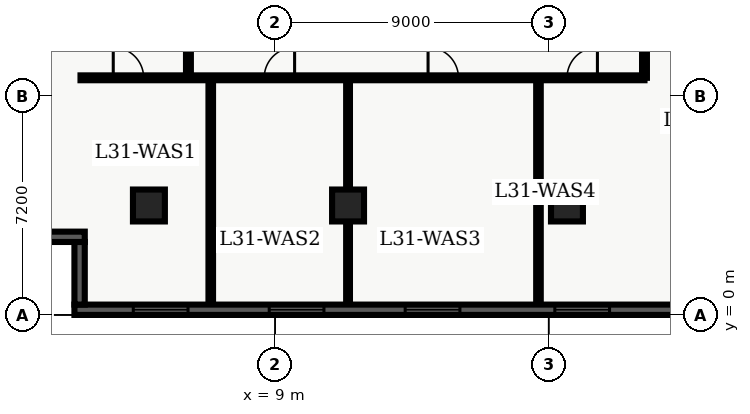
"""IFC4 building model, lengths in metres.
Left out: names, types, materials, properties, quantities, classifications, styles, units other than length and angle.
Written with IfcOpenShell. Run it as: python <this file> out.ifc"""

import sys

from ifc_helpers import new_model, entity, si_unit, converted_unit, direction, frame, origin_with_axes, origin_2d_with_axis, place, context, subcontext, project, spatial, polyline, rectangle, outline, extrude, element, fill, save


model = new_model("IFC4")
c1 = context("Model", 3, precision=1e-05, world=origin_with_axes(), true_north=direction((0.0, 1.0)))
c2 = subcontext(c1, "Body", "Model", "MODEL_VIEW")
j1 = project(units=[si_unit("LENGTHUNIT", "METRE"), converted_unit("PLANEANGLEUNIT", "DEGREE", entity("IfcPlaneAngleMeasure", 0.017), si_unit("PLANEANGLEUNIT", "RADIAN"), dimensions=[0, 0, 0, 0, 0, 0, 0])], contexts=[c1])
p1 = place(None, origin_with_axes())
s1 = spatial("IfcSite", under=j1, at=p1, CompositionType="ELEMENT")
p2 = place(p1, origin_with_axes())
s2 = spatial("IfcBuilding", under=s1, at=p2, CompositionType="ELEMENT")
p3 = place(p2, frame((0.0, 0.0, 129.0), z_axis=(0.0, 0.0, 1.0), x_axis=(1.0, 0.0, 0.0)))
s3 = spatial("IfcBuildingStorey", under=s2, at=p3, CompositionType="ELEMENT", Elevation=129.0)
for number, where, z_axis, x_axis in (
    (1, (11.4, 3.6, 0.0), (0.0, 0.0, 1.0), (1.0, 0.0, 0.0)),
    (2, (18.6, 3.6, 0.0), (0.0, 0.0, 1.0), (1.0, 0.0, 0.0)),
    (3, (4.85, 3.6, 0.0), (0.0, 0.0, 1.0), (1.0, 0.0, 0.0)),
):
    element("IfcColumn", number, at=place(p3, frame(where, z_axis=z_axis, x_axis=x_axis)), inside=s3, PredefinedType="COLUMN", context=c2, shape_type="SweptSolid", body=[
        extrude(rectangle(XDim=1.05, YDim=1.05, at=origin_2d_with_axis()), origin_with_axes(), (0.0, 0.0, 1.0), 3.9),
    ])
p4 = place(p3, frame((2.6, 7.8, 0.0), z_axis=(0.0, 0.0, 1.0), x_axis=(1.0, 0.0, 0.0)))
e4 = element("IfcWall", 4, at=p4, inside=s3, PredefinedType="PARTITIONING", context=c2, shape_type="SweptSolid", body=[
    extrude(outline(polyline([(0.0, -0.08), (18.55, -0.08), (18.55, 0.08), (0.0, 0.08), (0.0, -0.08)])), origin_with_axes(), (0.0, 0.0, 1.0), 2.7),
])
p5 = place(p4, frame((1.577, 0.0, 0.0), z_axis=(0.0, 0.0, 1.0), x_axis=(1.0, 0.0, 0.0)))
e5 = element("IfcOpeningElement", 5, at=p5, cuts=e4, PredefinedType="OPENING", context=c2, shape_type="SweptSolid", body=[
    extrude(rectangle(XDim=1.0, YDim=0.18, at=origin_2d_with_axis()), origin_with_axes(), (0.0, 0.0, 1.0), 2.15),
])
p6 = place(p4, frame((6.542, 0.0, 0.0), z_axis=(0.0, 0.0, 1.0), x_axis=(1.0, 0.0, 0.0)))
e6 = element("IfcOpeningElement", 6, at=p6, cuts=e4, PredefinedType="OPENING", context=c2, shape_type="SweptSolid", body=[
    extrude(rectangle(XDim=1.0, YDim=0.18, at=origin_2d_with_axis()), origin_with_axes(), (0.0, 0.0, 1.0), 2.15),
])
p7 = place(p4, frame((11.931, 0.0, 0.0), z_axis=(0.0, 0.0, 1.0), x_axis=(1.0, 0.0, 0.0)))
e7 = element("IfcOpeningElement", 7, at=p7, cuts=e4, PredefinedType="OPENING", context=c2, shape_type="SweptSolid", body=[
    extrude(rectangle(XDim=1.0, YDim=0.18, at=origin_2d_with_axis()), origin_with_axes(), (0.0, 0.0, 1.0), 2.15),
])
p8 = place(p4, frame((16.502, 0.0, 0.0), z_axis=(0.0, 0.0, 1.0), x_axis=(1.0, 0.0, 0.0)))
e8 = element("IfcOpeningElement", 8, at=p8, cuts=e4, PredefinedType="OPENING", context=c2, shape_type="SweptSolid", body=[
    extrude(rectangle(XDim=1.0, YDim=0.18, at=origin_2d_with_axis()), origin_with_axes(), (0.0, 0.0, 1.0), 2.15),
])
p9 = place(p3, frame((21.15, 7.8, 0.0), z_axis=(0.0, 0.0, 1.0), x_axis=(0.0, 1.0, 0.0)))
e9 = element("IfcWall", 9, at=p9, inside=s3, PredefinedType="PARTITIONING", context=c2, shape_type="SweptSolid", body=[
    extrude(outline(polyline([(0.0, -0.08), (32.7, -0.08), (32.7, 0.08), (0.0, 0.08), (0.0, -0.08)])), origin_with_axes(), (0.0, 0.0, 1.0), 2.7),
])
p10 = place(p9, frame((5.775, 0.0, 0.0), z_axis=(0.0, 0.0, 1.0), x_axis=(1.0, 0.0, 0.0)))
e10 = element("IfcOpeningElement", 10, at=p10, cuts=e9, PredefinedType="OPENING", context=c2, shape_type="SweptSolid", body=[
    extrude(rectangle(XDim=1.05, YDim=0.18, at=origin_2d_with_axis()), origin_with_axes(), (0.0, 0.0, 1.0), 2.15),
])
p11 = place(p3, frame((6.15, 7.8, 0.0), z_axis=(0.0, 0.0, 1.0), x_axis=(0.0, 1.0, 0.0)))
e11 = element("IfcWall", 11, at=p11, inside=s3, PredefinedType="PARTITIONING", context=c2, shape_type="SweptSolid", body=[
    extrude(outline(polyline([(0.0, -0.08), (32.7, -0.08), (32.7, 0.08), (0.0, 0.08), (0.0, -0.08)])), origin_with_axes(), (0.0, 0.0, 1.0), 2.7),
])
p12 = place(p11, frame((4.368, 0.0, 0.0), z_axis=(0.0, 0.0, 1.0), x_axis=(1.0, 0.0, 0.0)))
e12 = element("IfcOpeningElement", 12, at=p12, cuts=e11, PredefinedType="OPENING", context=c2, shape_type="SweptSolid", body=[
    extrude(rectangle(XDim=1.0, YDim=0.18, at=origin_2d_with_axis()), origin_with_axes(), (0.0, 0.0, 1.0), 2.15),
])
p13 = place(p11, frame((8.425, 0.0, 0.0), z_axis=(0.0, 0.0, 1.0), x_axis=(1.0, 0.0, 0.0)))
e13 = element("IfcOpeningElement", 13, at=p13, cuts=e11, PredefinedType="OPENING", context=c2, shape_type="SweptSolid", body=[
    extrude(rectangle(XDim=1.0, YDim=0.18, at=origin_2d_with_axis()), origin_with_axes(), (0.0, 0.0, 1.0), 2.15),
])
p14 = place(p11, frame((13.968, 0.0, 0.0), z_axis=(0.0, 0.0, 1.0), x_axis=(1.0, 0.0, 0.0)))
e14 = element("IfcOpeningElement", 14, at=p14, cuts=e11, PredefinedType="OPENING", context=c2, shape_type="SweptSolid", body=[
    extrude(rectangle(XDim=1.0, YDim=0.18, at=origin_2d_with_axis()), origin_with_axes(), (0.0, 0.0, 1.0), 2.15),
])
p15 = place(p11, frame((20.824, 0.0, 0.0), z_axis=(0.0, 0.0, 1.0), x_axis=(1.0, 0.0, 0.0)))
e15 = element("IfcOpeningElement", 15, at=p15, cuts=e11, PredefinedType="OPENING", context=c2, shape_type="SweptSolid", body=[
    extrude(rectangle(XDim=1.0, YDim=0.18, at=origin_2d_with_axis()), origin_with_axes(), (0.0, 0.0, 1.0), 2.15),
])
p16 = place(p11, frame((24.995, 0.0, 0.0), z_axis=(0.0, 0.0, 1.0), x_axis=(1.0, 0.0, 0.0)))
e16 = element("IfcOpeningElement", 16, at=p16, cuts=e11, PredefinedType="OPENING", context=c2, shape_type="SweptSolid", body=[
    extrude(rectangle(XDim=1.0, YDim=0.18, at=origin_2d_with_axis()), origin_with_axes(), (0.0, 0.0, 1.0), 2.15),
])
p17 = place(p11, frame((31.551, 0.0, 0.0), z_axis=(0.0, 0.0, 1.0), x_axis=(1.0, 0.0, 0.0)))
e17 = element("IfcOpeningElement", 17, at=p17, cuts=e11, PredefinedType="OPENING", context=c2, shape_type="SweptSolid", body=[
    extrude(rectangle(XDim=1.0, YDim=0.18, at=origin_2d_with_axis()), origin_with_axes(), (0.0, 0.0, 1.0), 2.15),
])
p18 = place(p3, frame((6.884, 0.335, 0.0), z_axis=(0.0, 0.0, 1.0), x_axis=(0.0, 1.0, 0.0)))
e18 = element("IfcWall", 18, at=p18, inside=s3, PredefinedType="PARTITIONING", context=c2, shape_type="SweptSolid", body=[
    extrude(outline(polyline([(0.0, -0.075), (7.365, -0.075), (7.365, 0.075), (0.0, 0.075), (0.0, -0.075)])), origin_with_axes(), (0.0, 0.0, 1.0), 2.7),
])
p19 = place(p3, frame((11.4, 0.335, 0.0), z_axis=(0.0, 0.0, 1.0), x_axis=(0.0, 1.0, 0.0)))
e19 = element("IfcWall", 19, at=p19, inside=s3, PredefinedType="PARTITIONING", context=c2, shape_type="SweptSolid", body=[
    extrude(outline(polyline([(0.0, -0.062), (7.365, -0.062), (7.365, 0.062), (0.0, 0.062), (0.0, -0.062)])), origin_with_axes(), (0.0, 0.0, 1.0), 2.7),
])
p20 = place(p3, frame((17.663, 0.335, 0.0), z_axis=(0.0, 0.0, 1.0), x_axis=(0.0, 1.0, 0.0)))
e20 = element("IfcWall", 20, at=p20, inside=s3, PredefinedType="PARTITIONING", context=c2, shape_type="SweptSolid", body=[
    extrude(outline(polyline([(0.0, -0.075), (7.365, -0.075), (7.365, 0.075), (0.0, 0.075), (0.0, -0.075)])), origin_with_axes(), (0.0, 0.0, 1.0), 2.7),
])
p21 = place(p3, frame((57.26, 0.17, 0.0), z_axis=(0.0, 0.0, 1.0), x_axis=(-1.0, 0.0, 0.0)))
e21 = element("IfcWall", 21, at=p21, inside=s3, PredefinedType="SOLIDWALL", context=c2, shape_type="SweptSolid", body=[
    extrude(outline(polyline([(0.0, -0.17), (54.86, -0.17), (54.86, 0.17), (0.0, 0.17), (0.0, -0.17)])), origin_with_axes(), (0.0, 0.0, 1.0), 3.66),
])
p22 = place(p21, frame((2.836, 0.0, 0.45), z_axis=(0.0, 0.0, 1.0), x_axis=(1.0, 0.0, 0.0)))
e22 = element("IfcOpeningElement", 22, at=p22, cuts=e21, PredefinedType="OPENING", context=c2, shape_type="SweptSolid", body=[
    extrude(rectangle(XDim=1.8, YDim=0.36, at=origin_2d_with_axis()), origin_with_axes(), (0.0, 0.0, 1.0), 2.1),
])
p23 = place(p21, frame((7.307, 0.0, 0.45), z_axis=(0.0, 0.0, 1.0), x_axis=(1.0, 0.0, 0.0)))
e23 = element("IfcOpeningElement", 23, at=p23, cuts=e21, PredefinedType="OPENING", context=c2, shape_type="SweptSolid", body=[
    extrude(rectangle(XDim=1.8, YDim=0.36, at=origin_2d_with_axis()), origin_with_axes(), (0.0, 0.0, 1.0), 2.1),
])
p24 = place(p21, frame((11.779, 0.0, 0.45), z_axis=(0.0, 0.0, 1.0), x_axis=(1.0, 0.0, 0.0)))
e24 = element("IfcOpeningElement", 24, at=p24, cuts=e21, PredefinedType="OPENING", context=c2, shape_type="SweptSolid", body=[
    extrude(rectangle(XDim=1.8, YDim=0.36, at=origin_2d_with_axis()), origin_with_axes(), (0.0, 0.0, 1.0), 2.1),
])
p25 = place(p21, frame((16.251, 0.0, 0.45), z_axis=(0.0, 0.0, 1.0), x_axis=(1.0, 0.0, 0.0)))
e25 = element("IfcOpeningElement", 25, at=p25, cuts=e21, PredefinedType="OPENING", context=c2, shape_type="SweptSolid", body=[
    extrude(rectangle(XDim=1.8, YDim=0.36, at=origin_2d_with_axis()), origin_with_axes(), (0.0, 0.0, 1.0), 2.1),
])
p26 = place(p21, frame((20.723, 0.0, 0.45), z_axis=(0.0, 0.0, 1.0), x_axis=(1.0, 0.0, 0.0)))
e26 = element("IfcOpeningElement", 26, at=p26, cuts=e21, PredefinedType="OPENING", context=c2, shape_type="SweptSolid", body=[
    extrude(rectangle(XDim=1.8, YDim=0.36, at=origin_2d_with_axis()), origin_with_axes(), (0.0, 0.0, 1.0), 2.1),
])
p27 = place(p21, frame((25.194, 0.0, 0.45), z_axis=(0.0, 0.0, 1.0), x_axis=(1.0, 0.0, 0.0)))
e27 = element("IfcOpeningElement", 27, at=p27, cuts=e21, PredefinedType="OPENING", context=c2, shape_type="SweptSolid", body=[
    extrude(rectangle(XDim=1.8, YDim=0.36, at=origin_2d_with_axis()), origin_with_axes(), (0.0, 0.0, 1.0), 2.1),
])
p28 = place(p21, frame((29.666, 0.0, 0.45), z_axis=(0.0, 0.0, 1.0), x_axis=(1.0, 0.0, 0.0)))
e28 = element("IfcOpeningElement", 28, at=p28, cuts=e21, PredefinedType="OPENING", context=c2, shape_type="SweptSolid", body=[
    extrude(rectangle(XDim=1.8, YDim=0.36, at=origin_2d_with_axis()), origin_with_axes(), (0.0, 0.0, 1.0), 2.1),
])
p29 = place(p21, frame((34.138, 0.0, 0.45), z_axis=(0.0, 0.0, 1.0), x_axis=(1.0, 0.0, 0.0)))
e29 = element("IfcOpeningElement", 29, at=p29, cuts=e21, PredefinedType="OPENING", context=c2, shape_type="SweptSolid", body=[
    extrude(rectangle(XDim=1.8, YDim=0.36, at=origin_2d_with_axis()), origin_with_axes(), (0.0, 0.0, 1.0), 2.1),
])
p30 = place(p21, frame((38.159, 0.0, 0.45), z_axis=(0.0, 0.0, 1.0), x_axis=(1.0, 0.0, 0.0)))
e30 = element("IfcOpeningElement", 30, at=p30, cuts=e21, PredefinedType="OPENING", context=c2, shape_type="SweptSolid", body=[
    extrude(rectangle(XDim=1.8, YDim=0.36, at=origin_2d_with_axis()), origin_with_axes(), (0.0, 0.0, 1.0), 2.1),
])
p31 = place(p21, frame((43.081, 0.0, 0.45), z_axis=(0.0, 0.0, 1.0), x_axis=(1.0, 0.0, 0.0)))
e31 = element("IfcOpeningElement", 31, at=p31, cuts=e21, PredefinedType="OPENING", context=c2, shape_type="SweptSolid", body=[
    extrude(rectangle(XDim=1.8, YDim=0.36, at=origin_2d_with_axis()), origin_with_axes(), (0.0, 0.0, 1.0), 2.1),
])
p32 = place(p21, frame((47.553, 0.0, 0.45), z_axis=(0.0, 0.0, 1.0), x_axis=(1.0, 0.0, 0.0)))
e32 = element("IfcOpeningElement", 32, at=p32, cuts=e21, PredefinedType="OPENING", context=c2, shape_type="SweptSolid", body=[
    extrude(rectangle(XDim=1.8, YDim=0.36, at=origin_2d_with_axis()), origin_with_axes(), (0.0, 0.0, 1.0), 2.1),
])
p33 = place(p21, frame((52.024, 0.0, 0.45), z_axis=(0.0, 0.0, 1.0), x_axis=(1.0, 0.0, 0.0)))
e33 = element("IfcOpeningElement", 33, at=p33, cuts=e21, PredefinedType="OPENING", context=c2, shape_type="SweptSolid", body=[
    extrude(rectangle(XDim=1.8, YDim=0.36, at=origin_2d_with_axis()), origin_with_axes(), (0.0, 0.0, 1.0), 2.1),
])
p34 = place(p3, frame((2.57, 0.34, 0.0), z_axis=(0.0, 0.0, 1.0), x_axis=(0.0, 1.0, 0.0)))
e34 = element("IfcWall", 34, at=p34, inside=s3, PredefinedType="SOLIDWALL", context=c2, shape_type="SweptSolid", body=[
    extrude(outline(polyline([(0.0, -0.17), (2.06, -0.17), (2.06, 0.17), (0.0, 0.17), (0.0, -0.17)])), origin_with_axes(), (0.0, 0.0, 1.0), 3.66),
])
p35 = place(p3, frame((2.74, 2.57, 0.0), z_axis=(0.0, 0.0, 1.0), x_axis=(-1.0, 0.0, 0.0)))
e35 = element("IfcWall", 35, at=p35, inside=s3, PredefinedType="SOLIDWALL", context=c2, shape_type="SweptSolid", body=[
    extrude(outline(polyline([(0.0, -0.17), (2.74, -0.17), (2.74, 0.17), (0.0, 0.17), (0.0, -0.17)])), origin_with_axes(), (0.0, 0.0, 1.0), 3.66),
])
p36 = place(p4, frame((1.577, 0.0, 0.0), z_axis=(0.0, 0.0, 1.0), x_axis=(1.0, 0.0, 0.0)))
e36 = element("IfcDoor", 36, at=p36, inside=s3, OperationType="SINGLE_SWING_LEFT", PredefinedType="DOOR", context=c2, shape_type="SweptSolid", body=[
    extrude(rectangle(XDim=1.0, YDim=0.09, at=origin_2d_with_axis()), origin_with_axes(), (0.0, 0.0, 1.0), 2.15),
])
fill(e5, e36)
p37 = place(p4, frame((6.542, 0.0, 0.0), z_axis=(0.0, 0.0, 1.0), x_axis=(1.0, 0.0, 0.0)))
e37 = element("IfcDoor", 37, at=p37, inside=s3, OperationType="SINGLE_SWING_RIGHT", PredefinedType="DOOR", context=c2, shape_type="SweptSolid", body=[
    extrude(rectangle(XDim=1.0, YDim=0.09, at=origin_2d_with_axis()), origin_with_axes(), (0.0, 0.0, 1.0), 2.15),
])
fill(e6, e37)
p38 = place(p4, frame((11.931, 0.0, 0.0), z_axis=(0.0, 0.0, 1.0), x_axis=(1.0, 0.0, 0.0)))
e38 = element("IfcDoor", 38, at=p38, inside=s3, OperationType="SINGLE_SWING_LEFT", PredefinedType="DOOR", context=c2, shape_type="SweptSolid", body=[
    extrude(rectangle(XDim=1.0, YDim=0.09, at=origin_2d_with_axis()), origin_with_axes(), (0.0, 0.0, 1.0), 2.15),
])
fill(e7, e38)
p39 = place(p4, frame((16.502, 0.0, 0.0), z_axis=(0.0, 0.0, 1.0), x_axis=(1.0, 0.0, 0.0)))
e39 = element("IfcDoor", 39, at=p39, inside=s3, OperationType="SINGLE_SWING_RIGHT", PredefinedType="DOOR", context=c2, shape_type="SweptSolid", body=[
    extrude(rectangle(XDim=1.0, YDim=0.09, at=origin_2d_with_axis()), origin_with_axes(), (0.0, 0.0, 1.0), 2.15),
])
fill(e8, e39)
p40 = place(p21, frame((38.159, 0.0, 0.45), z_axis=(0.0, 0.0, 1.0), x_axis=(1.0, 0.0, 0.0)))
e40 = element("IfcWindow", 40, at=p40, inside=s3, PredefinedType="WINDOW", context=c2, shape_type="SweptSolid", body=[
    extrude(rectangle(XDim=1.8, YDim=0.09, at=origin_2d_with_axis()), origin_with_axes(), (0.0, 0.0, 1.0), 2.1),
])
fill(e30, e40)
p41 = place(p21, frame((43.081, 0.0, 0.45), z_axis=(0.0, 0.0, 1.0), x_axis=(1.0, 0.0, 0.0)))
e41 = element("IfcWindow", 41, at=p41, inside=s3, PredefinedType="WINDOW", context=c2, shape_type="SweptSolid", body=[
    extrude(rectangle(XDim=1.8, YDim=0.09, at=origin_2d_with_axis()), origin_with_axes(), (0.0, 0.0, 1.0), 2.1),
])
fill(e31, e41)
p42 = place(p21, frame((47.553, 0.0, 0.45), z_axis=(0.0, 0.0, 1.0), x_axis=(1.0, 0.0, 0.0)))
e42 = element("IfcWindow", 42, at=p42, inside=s3, PredefinedType="WINDOW", context=c2, shape_type="SweptSolid", body=[
    extrude(rectangle(XDim=1.8, YDim=0.09, at=origin_2d_with_axis()), origin_with_axes(), (0.0, 0.0, 1.0), 2.1),
])
fill(e32, e42)
p43 = place(p21, frame((52.024, 0.0, 0.45), z_axis=(0.0, 0.0, 1.0), x_axis=(1.0, 0.0, 0.0)))
e43 = element("IfcWindow", 43, at=p43, inside=s3, PredefinedType="WINDOW", context=c2, shape_type="SweptSolid", body=[
    extrude(rectangle(XDim=1.8, YDim=0.09, at=origin_2d_with_axis()), origin_with_axes(), (0.0, 0.0, 1.0), 2.1),
])
fill(e33, e43)
save(model, sys.argv[1])
